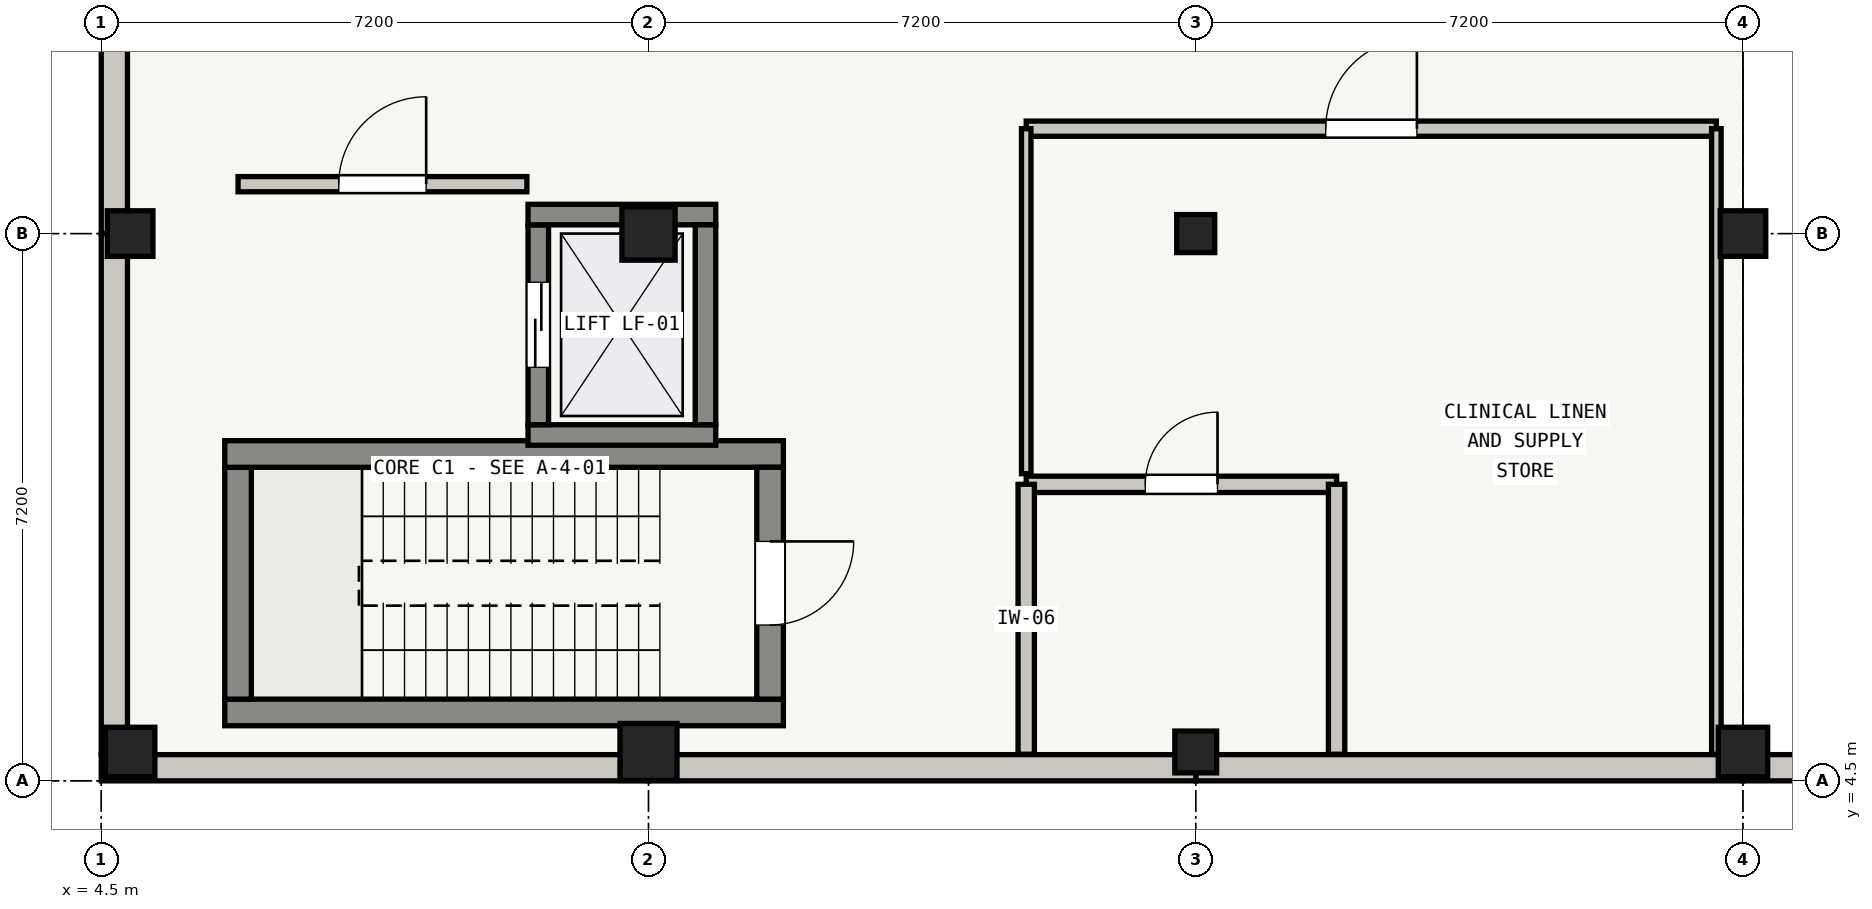
"""IFC4 building model, lengths in metres.
Left out: names, types, materials, properties, quantities, classifications, styles, units other than length and angle.
Written with IfcOpenShell. Run it as: python <this file> out.ifc"""

import sys

from ifc_helpers import new_model, si_unit, direction, frame, frame_2d, origin, origin_2d, place, context, subcontext, project, spatial, rectangle, extrude, element, fill, save


model = new_model("IFC4")
c1 = context("Model", 3, precision=1e-05, world=origin(), true_north=direction((0.0, 1.0)))
c2 = subcontext(c1, "Body", "Model", "MODEL_VIEW")
j1 = project(units=[si_unit("LENGTHUNIT", "METRE"), si_unit("PLANEANGLEUNIT", "RADIAN")], contexts=[c1])
p1 = place(None, origin())
s1 = spatial("IfcSite", under=j1, at=p1, CompositionType="ELEMENT")
p2 = place(p1, origin())
s2 = spatial("IfcBuilding", under=s1, at=p2, CompositionType="ELEMENT")
p3 = place(p2, frame((0.0, 0.0, -4.5)))
s3 = spatial("IfcBuildingStorey", under=s2, at=p3, CompositionType="ELEMENT", Elevation=-4.5)
p4 = place(p3, frame((4.88, 4.88, -0.42), z_axis=(0.0, 0.0, 1.0), x_axis=(1.0, 0.0, 0.0)))
e1 = element("IfcColumn", 1, at=p4, inside=s3, PredefinedType="COLUMN", context=c2, shape_type="SweptSolid", body=[
    extrude(rectangle(XDim=0.65, YDim=0.65, at=origin_2d()), origin(), (0.0, 0.0, 1.0), 4.64),
])
p5 = place(p3, frame((4.88, 11.7, -0.42), z_axis=(0.0, 0.0, 1.0), x_axis=(1.0, 0.0, 0.0)))
e2 = element("IfcColumn", 2, at=p5, inside=s3, PredefinedType="COLUMN", context=c2, shape_type="SweptSolid", body=[
    extrude(rectangle(XDim=0.6, YDim=0.6, at=origin_2d()), origin(), (0.0, 0.0, 1.0), 4.64),
])
p6 = place(p3, frame((11.7, 4.88, -0.42), z_axis=(0.0, 0.0, 1.0), x_axis=(1.0, 0.0, 0.0)))
e3 = element("IfcColumn", 3, at=p6, inside=s3, PredefinedType="COLUMN", context=c2, shape_type="SweptSolid", body=[
    extrude(rectangle(XDim=0.75, YDim=0.75, at=origin_2d()), origin(), (0.0, 0.0, 1.0), 4.64),
])
p7 = place(p3, frame((11.7, 11.7, -0.42), z_axis=(0.0, 0.0, 1.0), x_axis=(1.0, 0.0, 0.0)))
e4 = element("IfcColumn", 4, at=p7, inside=s3, PredefinedType="COLUMN", context=c2, shape_type="SweptSolid", body=[
    extrude(rectangle(XDim=0.7, YDim=0.7, at=origin_2d()), origin(), (0.0, 0.0, 1.0), 4.64),
])
p8 = place(p3, frame((18.9, 4.88, -0.42), z_axis=(0.0, 0.0, 1.0), x_axis=(1.0, 0.0, 0.0)))
e5 = element("IfcColumn", 5, at=p8, inside=s3, PredefinedType="COLUMN", context=c2, shape_type="SweptSolid", body=[
    extrude(rectangle(XDim=0.55, YDim=0.55, at=origin_2d()), origin(), (0.0, 0.0, 1.0), 4.64),
])
p9 = place(p3, frame((18.9, 11.7, -0.42), z_axis=(0.0, 0.0, 1.0), x_axis=(1.0, 0.0, 0.0)))
e6 = element("IfcColumn", 6, at=p9, inside=s3, PredefinedType="COLUMN", context=c2, shape_type="SweptSolid", body=[
    extrude(rectangle(XDim=0.5, YDim=0.5, at=origin_2d()), origin(), (0.0, 0.0, 1.0), 4.64),
])
p10 = place(p3, frame((26.1, 4.88, -0.42), z_axis=(0.0, 0.0, 1.0), x_axis=(1.0, 0.0, 0.0)))
e7 = element("IfcColumn", 7, at=p10, inside=s3, PredefinedType="COLUMN", context=c2, shape_type="SweptSolid", body=[
    extrude(rectangle(XDim=0.65, YDim=0.65, at=origin_2d()), origin(), (0.0, 0.0, 1.0), 4.64),
])
p11 = place(p3, frame((26.1, 11.7, -0.42), z_axis=(0.0, 0.0, 1.0), x_axis=(1.0, 0.0, 0.0)))
e8 = element("IfcColumn", 8, at=p11, inside=s3, PredefinedType="COLUMN", context=c2, shape_type="SweptSolid", body=[
    extrude(rectangle(XDim=0.6, YDim=0.6, at=origin_2d()), origin(), (0.0, 0.0, 1.0), 4.64),
])
p12 = place(p3, frame((33.3, 4.673, -0.42), z_axis=(0.0, 0.0, 1.0), x_axis=(-1.0, 0.0, 0.0)))
e9 = element("IfcWall", 9, at=p12, inside=s3, PredefinedType="SOLIDWALL", context=c2, shape_type="SweptSolid", body=[
    extrude(rectangle(XDim=7.2, YDim=0.345, at=frame_2d((3.6, 0.0))), origin(), (0.0, 0.0, 1.0), 4.025),
])
p13 = place(p3, frame((26.1, 4.673, -0.42), z_axis=(0.0, 0.0, 1.0), x_axis=(-1.0, 0.0, 0.0)))
e10 = element("IfcWall", 10, at=p13, inside=s3, PredefinedType="SOLIDWALL", context=c2, shape_type="SweptSolid", body=[
    extrude(rectangle(XDim=7.2, YDim=0.345, at=frame_2d((3.6, 0.0))), origin(), (0.0, 0.0, 1.0), 4.025),
])
for number, where, z_axis, x_axis in (
    (11, (18.9, 4.673, -0.42), (0.0, 0.0, 1.0), (-1.0, 0.0, 0.0)),
    (12, (11.7, 4.673, -0.42), (0.0, 0.0, 1.0), (-1.0, 0.0, 0.0)),
):
    element("IfcWall", number, at=place(p3, frame(where, z_axis=z_axis, x_axis=x_axis)), inside=s3, PredefinedType="SOLIDWALL", context=c2, shape_type="SweptSolid", body=[
        extrude(rectangle(XDim=7.2, YDim=0.345, at=frame_2d((3.6, 0.0))), origin(), (0.0, 0.0, 1.0), 4.045),
    ])
p14 = place(p3, frame((4.673, 4.845, -0.42), z_axis=(0.0, 0.0, 1.0), x_axis=(0.0, 1.0, 0.0)))
e13 = element("IfcWall", 13, at=p14, inside=s3, PredefinedType="SOLIDWALL", context=c2, shape_type="SweptSolid", body=[
    extrude(rectangle(XDim=6.855, YDim=0.345, at=frame_2d((3.427, 0.0))), origin(), (0.0, 0.0, 1.0), 4.005),
])
p15 = place(p3, frame((4.673, 11.7, -0.42), z_axis=(0.0, 0.0, 1.0), x_axis=(0.0, 1.0, 0.0)))
e14 = element("IfcWall", 14, at=p15, inside=s3, PredefinedType="SOLIDWALL", context=c2, shape_type="SweptSolid", body=[
    extrude(rectangle(XDim=7.2, YDim=0.345, at=frame_2d((3.6, 0.0))), origin(), (0.0, 0.0, 1.0), 4.005),
])
p16 = place(p3, frame((13.475, 5.4, 0.0), z_axis=(0.0, 0.0, 1.0), x_axis=(-1.0, 0.0, 0.0)))
e15 = element("IfcWall", 15, at=p16, inside=s3, PredefinedType="SHEAR", context=c2, shape_type="SweptSolid", body=[
    extrude(rectangle(XDim=7.35, YDim=0.35, at=frame_2d((3.675, 0.0))), origin(), (0.0, 0.0, 1.0), 4.22),
])
p17 = place(p3, frame((6.3, 5.575, 0.0), z_axis=(0.0, 0.0, 1.0), x_axis=(0.0, 1.0, 0.0)))
e16 = element("IfcWall", 16, at=p17, inside=s3, PredefinedType="SHEAR", context=c2, shape_type="SweptSolid", body=[
    extrude(rectangle(XDim=3.05, YDim=0.35, at=frame_2d((1.525, 0.0))), origin(), (0.0, 0.0, 1.0), 4.22),
])
p18 = place(p3, frame((6.125, 8.8, 0.0), z_axis=(0.0, 0.0, 1.0), x_axis=(1.0, 0.0, 0.0)))
e17 = element("IfcWall", 17, at=p18, inside=s3, PredefinedType="SHEAR", context=c2, shape_type="SweptSolid", body=[
    extrude(rectangle(XDim=7.35, YDim=0.35, at=frame_2d((3.675, 0.0))), origin(), (0.0, 0.0, 1.0), 4.22),
])
p19 = place(p3, frame((13.3, 8.625, 0.0), z_axis=(0.0, 0.0, 1.0), x_axis=(0.0, -1.0, 0.0)))
e18 = element("IfcWall", 18, at=p19, inside=s3, PredefinedType="SHEAR", context=c2, shape_type="SweptSolid", body=[
    extrude(rectangle(XDim=3.05, YDim=0.35, at=frame_2d((1.525, 0.0))), origin(), (0.0, 0.0, 1.0), 4.22),
])
p20 = place(p19, frame((0.975, 0.0, 0.0)))
e19 = element("IfcOpeningElement", 19, at=p20, cuts=e18, PredefinedType="OPENING", context=c2, shape_type="SweptSolid", body=[
    extrude(rectangle(XDim=1.1, YDim=2.05, at=frame_2d((0.55, 1.025))), frame((0.0, 0.175, 0.0), z_axis=(0.0, -1.0, 0.0), x_axis=(1.0, 0.0, 0.0)), (0.0, 0.0, 1.0), 0.35),
])
p21 = place(p3, frame((12.585, 9.05, 0.0), z_axis=(0.0, 0.0, 1.0), x_axis=(-1.0, 0.0, 0.0)))
e20 = element("IfcWall", 20, at=p21, inside=s3, PredefinedType="SHEAR", context=c2, shape_type="SweptSolid", body=[
    extrude(rectangle(XDim=2.47, YDim=0.27, at=frame_2d((1.235, 0.0))), origin(), (0.0, 0.0, 1.0), 4.22),
])
p22 = place(p3, frame((10.25, 9.185, 0.0), z_axis=(0.0, 0.0, 1.0), x_axis=(0.0, 1.0, 0.0)))
e21 = element("IfcWall", 21, at=p22, inside=s3, PredefinedType="SHEAR", context=c2, shape_type="SweptSolid", body=[
    extrude(rectangle(XDim=2.63, YDim=0.27, at=frame_2d((1.315, 0.0))), origin(), (0.0, 0.0, 1.0), 4.22),
])
p23 = place(p22, frame((0.755, 0.0, 0.0)))
e22 = element("IfcOpeningElement", 22, at=p23, cuts=e21, PredefinedType="OPENING", context=c2, shape_type="SweptSolid", body=[
    extrude(rectangle(XDim=1.12, YDim=2.1, at=frame_2d((0.56, 1.05))), frame((0.0, 0.135, 0.0), z_axis=(0.0, -1.0, 0.0), x_axis=(1.0, 0.0, 0.0)), (0.0, 0.0, 1.0), 0.27),
])
p24 = place(p3, frame((10.115, 11.95, 0.0), z_axis=(0.0, 0.0, 1.0), x_axis=(1.0, 0.0, 0.0)))
e23 = element("IfcWall", 23, at=p24, inside=s3, PredefinedType="SHEAR", context=c2, shape_type="SweptSolid", body=[
    extrude(rectangle(XDim=2.47, YDim=0.27, at=frame_2d((1.235, 0.0))), origin(), (0.0, 0.0, 1.0), 4.22),
])
p25 = place(p3, frame((12.45, 11.815, 0.0), z_axis=(0.0, 0.0, 1.0), x_axis=(0.0, -1.0, 0.0)))
e24 = element("IfcWall", 24, at=p25, inside=s3, PredefinedType="SHEAR", context=c2, shape_type="SweptSolid", body=[
    extrude(rectangle(XDim=2.63, YDim=0.27, at=frame_2d((1.315, 0.0))), origin(), (0.0, 0.0, 1.0), 4.22),
])
p26 = place(p3, frame((6.3, 12.35, 0.0), z_axis=(0.0, 0.0, 1.0), x_axis=(1.0, 0.0, 0.0)))
e25 = element("IfcWall", 25, at=p26, inside=s3, PredefinedType="SOLIDWALL", context=c2, shape_type="SweptSolid", body=[
    extrude(rectangle(XDim=3.8, YDim=0.2, at=frame_2d((1.9, 0.0))), origin(), (0.0, 0.0, 1.0), 3.24),
])
p27 = place(p26, frame((1.325, 0.0, 0.0)))
e26 = element("IfcOpeningElement", 26, at=p27, cuts=e25, PredefinedType="OPENING", context=c2, shape_type="SweptSolid", body=[
    extrude(rectangle(XDim=1.15, YDim=2.05, at=frame_2d((0.575, 1.025))), frame((0.0, 0.1, 0.0), z_axis=(0.0, -1.0, 0.0), x_axis=(1.0, 0.0, 0.0)), (0.0, 0.0, 1.0), 0.2),
])
p28 = place(p3, frame((16.67, 8.401, 0.0), z_axis=(0.0, 0.0, 1.0), x_axis=(1.0, 0.0, 0.0)))
e27 = element("IfcWall", 27, at=p28, inside=s3, PredefinedType="PLUMBINGWALL", context=c2, shape_type="SweptSolid", body=[
    extrude(rectangle(XDim=4.083, YDim=0.215, at=frame_2d((2.042, 0.0))), origin(), (0.0, 0.0, 1.0), 3.24),
])
p29 = place(p28, frame((1.567, 0.0, 0.0)))
e28 = element("IfcOpeningElement", 28, at=p29, cuts=e27, PredefinedType="OPENING", context=c2, shape_type="SweptSolid", body=[
    extrude(rectangle(XDim=0.95, YDim=2.05, at=frame_2d((0.475, 1.025))), frame((0.0, 0.107, 0.0), z_axis=(0.0, -1.0, 0.0), x_axis=(1.0, 0.0, 0.0)), (0.0, 0.0, 1.0), 0.215),
])
for number, where, z_axis, x_axis in (
    (29, (16.67, 4.85, 0.0), (0.0, 0.0, 1.0), (0.0, 1.0, 0.0)),
    (30, (20.753, 8.401, 0.0), (0.0, 0.0, 1.0), (0.0, -1.0, 0.0)),
):
    element("IfcWall", number, at=place(p3, frame(where, z_axis=z_axis, x_axis=x_axis)), inside=s3, PredefinedType="PLUMBINGWALL", context=c2, shape_type="SweptSolid", body=[
        extrude(rectangle(XDim=3.551, YDim=0.215, at=frame_2d((1.775, 0.0))), origin(), (0.0, 0.0, 1.0), 3.24),
    ])
p30 = place(p3, frame((16.67, 13.08, 0.0), z_axis=(0.0, 0.0, 1.0), x_axis=(1.0, 0.0, 0.0)))
e31 = element("IfcWall", 31, at=p30, inside=s3, PredefinedType="SOLIDWALL", context=c2, shape_type="SweptSolid", body=[
    extrude(rectangle(XDim=9.08, YDim=0.2, at=frame_2d((4.54, 0.0))), origin(), (0.0, 0.0, 1.0), 3.24),
])
p31 = place(p30, frame((3.94, 0.0, 0.0)))
e32 = element("IfcOpeningElement", 32, at=p31, cuts=e31, PredefinedType="OPENING", context=c2, shape_type="SweptSolid", body=[
    extrude(rectangle(XDim=1.2, YDim=2.05, at=frame_2d((0.6, 1.025))), frame((0.0, 0.1, 0.0), z_axis=(0.0, -1.0, 0.0), x_axis=(1.0, 0.0, 0.0)), (0.0, 0.0, 1.0), 0.2),
])
p32 = place(p3, frame((16.67, 8.541, 0.0), z_axis=(0.0, 0.0, 1.0), x_axis=(0.0, 1.0, 0.0)))
e33 = element("IfcWall", 33, at=p32, inside=s3, PredefinedType="PARTITIONING", context=c2, shape_type="SweptSolid", body=[
    extrude(rectangle(XDim=4.539, YDim=0.125, at=frame_2d((2.27, 0.0))), origin(), (0.0, 0.0, 1.0), 3.24),
])
p33 = place(p3, frame((25.75, 13.08, 0.0), z_axis=(0.0, 0.0, 1.0), x_axis=(0.0, -1.0, 0.0)))
e34 = element("IfcWall", 34, at=p33, inside=s3, PredefinedType="PARTITIONING", context=c2, shape_type="SweptSolid", body=[
    extrude(rectangle(XDim=8.23, YDim=0.125, at=frame_2d((4.115, 0.0))), origin(), (0.0, 0.0, 1.0), 3.24),
])
p34 = place(p20, origin())
e35 = element("IfcDoor", 35, at=p34, inside=s3, OperationType="SINGLE_SWING_LEFT", PredefinedType="DOOR", context=c2, shape_type="SweptSolid", body=[
    extrude(rectangle(XDim=1.1, YDim=2.05, at=frame_2d((0.55, 1.025))), frame((0.0, 0.025, 0.0), z_axis=(0.0, -1.0, 0.0), x_axis=(1.0, 0.0, 0.0)), (0.0, 0.0, 1.0), 0.05),
])
fill(e19, e35)
p35 = place(p23, origin())
e36 = element("IfcDoor", 36, at=p35, inside=s3, OperationType="DOUBLE_DOOR_SLIDING", PredefinedType="DOOR", context=c2, shape_type="SweptSolid", body=[
    extrude(rectangle(XDim=1.12, YDim=2.1, at=frame_2d((0.56, 1.05))), frame((0.0, 0.025, 0.0), z_axis=(0.0, -1.0, 0.0), x_axis=(1.0, 0.0, 0.0)), (0.0, 0.0, 1.0), 0.05),
])
fill(e22, e36)
p36 = place(p27, origin())
e37 = element("IfcDoor", 37, at=p36, inside=s3, OperationType="SINGLE_SWING_RIGHT", PredefinedType="DOOR", context=c2, shape_type="SweptSolid", body=[
    extrude(rectangle(XDim=1.15, YDim=2.05, at=frame_2d((0.575, 1.025))), frame((0.0, 0.025, 0.0), z_axis=(0.0, -1.0, 0.0), x_axis=(1.0, 0.0, 0.0)), (0.0, 0.0, 1.0), 0.05),
])
fill(e26, e37)
p37 = place(p29, origin())
e38 = element("IfcDoor", 38, at=p37, inside=s3, OperationType="SINGLE_SWING_RIGHT", PredefinedType="DOOR", context=c2, shape_type="SweptSolid", body=[
    extrude(rectangle(XDim=0.95, YDim=2.05, at=frame_2d((0.475, 1.025))), frame((0.0, 0.025, 0.0), z_axis=(0.0, -1.0, 0.0), x_axis=(1.0, 0.0, 0.0)), (0.0, 0.0, 1.0), 0.05),
])
fill(e28, e38)
p38 = place(p31, origin())
e39 = element("IfcDoor", 39, at=p38, inside=s3, OperationType="SINGLE_SWING_RIGHT", PredefinedType="DOOR", context=c2, shape_type="SweptSolid", body=[
    extrude(rectangle(XDim=1.2, YDim=2.05, at=frame_2d((0.6, 1.025))), frame((0.0, 0.025, 0.0), z_axis=(0.0, -1.0, 0.0), x_axis=(1.0, 0.0, 0.0)), (0.0, 0.0, 1.0), 0.05),
])
fill(e32, e39)
save(model, sys.argv[1])
